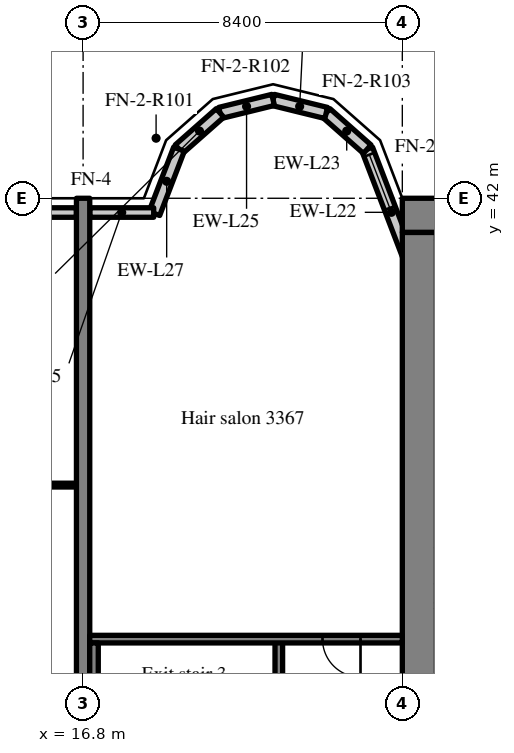
"""IFC4 building model, lengths in metres.
Left out: names, types, materials, properties, quantities, classifications, styles, units other than length and angle.
Written with IfcOpenShell. Run it as: python <this file> out.ifc"""

import sys

from ifc_helpers import new_model, si_unit, direction, frame, frame_2d, origin, place, context, subcontext, project, spatial, rectangle, extrude, source, transform, mapped, element, fill, save


model = new_model("IFC4")
c1 = context("Model", 3, precision=1e-05, world=origin(), true_north=direction((0.0, 1.0)))
c2 = subcontext(c1, "Body", "Model", "MODEL_VIEW")
j1 = project(units=[si_unit("LENGTHUNIT", "METRE"), si_unit("PLANEANGLEUNIT", "RADIAN")], contexts=[c1])
p1 = place(None, origin())
s1 = spatial("IfcSite", under=j1, at=p1, CompositionType="ELEMENT")
p2 = place(p1, origin())
s2 = spatial("IfcBuilding", under=s1, at=p2, CompositionType="ELEMENT")
p3 = place(p2, frame((0.0, 0.0, 137.0)))
s3 = spatial("IfcBuildingStorey", under=s2, at=p3, CompositionType="ELEMENT", Elevation=137.0)
m1 = source(origin(), c2, "Body", "SweptSolid", [
    extrude(rectangle(XDim=50.4, YDim=0.9, at=frame_2d((25.2, 0.0))), origin(), (0.0, 0.0, 1.0), 3.52),
])
p4 = place(p3, frame((25.2, 41.55, 0.0), z_axis=(0.0, 0.0, 1.0), x_axis=(1.0, 0.0, 0.0)))
e1 = element("IfcWall", 1, at=p4, inside=s3, PredefinedType="SHEAR", context=c2, shape_type="MappedRepresentation", body=[
    mapped(m1, transform((0.0, 0.0, 0.0), scale=1.0)),
])
m2 = source(origin(), c2, "Body", "SweptSolid", [
    extrude(rectangle(XDim=18.2, YDim=0.9, at=frame_2d((9.1, 0.0))), origin(), (0.0, 0.0, 1.0), 3.52),
])
p5 = place(p3, frame((25.65, 22.9, 0.0), z_axis=(0.0, 0.0, 1.0), x_axis=(0.0, 1.0, 0.0)))
e2 = element("IfcWall", 2, at=p5, inside=s3, PredefinedType="SHEAR", context=c2, shape_type="MappedRepresentation", body=[
    mapped(m2, transform((0.0, 0.0, 0.0), scale=1.0)),
])
m3 = source(origin(), c2, "Body", "SweptSolid", [
    extrude(rectangle(XDim=20.0, YDim=0.35, at=frame_2d((10.0, 0.0))), origin(), (0.0, 0.0, 1.0), 3.52),
])
p6 = place(p3, frame((16.8, 22.0, 0.0), z_axis=(0.0, 0.0, 1.0), x_axis=(0.0, 1.0, 0.0)))
e3 = element("IfcWall", 3, at=p6, inside=s3, PredefinedType="SHEAR", context=c2, shape_type="MappedRepresentation", body=[
    mapped(m3, transform((0.0, 0.0, 0.0), scale=1.0)),
])
m4 = source(origin(), c2, "Body", "SweptSolid", [
    extrude(rectangle(XDim=3.559, YDim=0.3, at=frame_2d((1.78, 0.0))), origin(), (0.0, 0.0, 1.0), 3.52),
])
p7 = place(p3, frame((25.55, 39.969, 0.0), z_axis=(0.0, 0.0, 1.0), x_axis=(-0.35779745313, 0.933799219604, 0.0)))
e4 = element("IfcWall", 4, at=p7, inside=s3, PredefinedType="SOLIDWALL", context=c2, shape_type="MappedRepresentation", body=[
    mapped(m4, transform((0.0, 0.0, 0.0), scale=1.0)),
])
m5 = source(origin(), c2, "Body", "SweptSolid", [
    extrude(rectangle(XDim=1.5, YDim=2.0, at=frame_2d((0.75, 1.0))), frame((0.0, 0.16, 0.0), z_axis=(0.0, -1.0, 0.0), x_axis=(1.0, 0.0, 0.0)), (0.0, 0.0, 1.0), 0.32),
])
p8 = place(p7, frame((1.903, 0.0, 0.9)))
e5 = element("IfcOpeningElement", 5, at=p8, cuts=e4, PredefinedType="OPENING", context=c2, shape_type="MappedRepresentation", body=[
    mapped(m5, transform((0.0, 0.0, 0.0), scale=1.0)),
])
m6 = source(origin(), c2, "Body", "SweptSolid", [
    extrude(rectangle(XDim=1.44, YDim=0.3, at=frame_2d((0.72, 0.0))), origin(), (0.0, 0.0, 1.0), 3.52),
])
p9 = place(p3, frame((24.277, 43.292, 0.0), z_axis=(0.0, 0.0, 1.0), x_axis=(-0.749649827867, 0.661834673902, 0.0)))
e6 = element("IfcWall", 6, at=p9, inside=s3, PredefinedType="SOLIDWALL", context=c2, shape_type="MappedRepresentation", body=[
    mapped(m6, transform((0.0, 0.0, 0.0), scale=1.0)),
])
m7 = source(origin(), c2, "Body", "SweptSolid", [
    extrude(rectangle(XDim=1.438, YDim=0.3, at=frame_2d((0.719, 0.0))), origin(), (0.0, 0.0, 1.0), 3.52),
])
p10 = place(p3, frame((23.197, 44.245, 0.0), z_axis=(0.0, 0.0, 1.0), x_axis=(-0.971152283879, 0.238460146601, 0.0)))
e7 = element("IfcWall", 7, at=p10, inside=s3, PredefinedType="SOLIDWALL", context=c2, shape_type="MappedRepresentation", body=[
    mapped(m7, transform((0.0, 0.0, 0.0), scale=1.0)),
])
m8 = source(origin(), c2, "Body", "SweptSolid", [
    extrude(rectangle(XDim=1.439, YDim=0.3, at=frame_2d((0.719, 0.0))), origin(), (0.0, 0.0, 1.0), 3.52),
])
p11 = place(p3, frame((21.8, 44.588, 0.0), z_axis=(0.0, 0.0, 1.0), x_axis=(-0.971161932466, -0.238420848351, 0.0)))
e8 = element("IfcWall", 8, at=p11, inside=s3, PredefinedType="SOLIDWALL", context=c2, shape_type="MappedRepresentation", body=[
    mapped(m8, transform((0.0, 0.0, 0.0), scale=1.0)),
])
m9 = source(origin(), c2, "Body", "SweptSolid", [
    extrude(rectangle(XDim=1.44, YDim=0.3, at=frame_2d((0.72, 0.0))), origin(), (0.0, 0.0, 1.0), 3.52),
])
p12 = place(p3, frame((20.403, 44.245, 0.0), z_axis=(0.0, 0.0, 1.0), x_axis=(-0.74957555648, -0.661918790432, 0.0)))
e9 = element("IfcWall", 9, at=p12, inside=s3, PredefinedType="SOLIDWALL", context=c2, shape_type="MappedRepresentation", body=[
    mapped(m9, transform((0.0, 0.0, 0.0), scale=1.0)),
])
m10 = source(origin(), c2, "Body", "SweptSolid", [
    extrude(rectangle(XDim=1.812, YDim=0.3, at=frame_2d((0.906, 0.0))), origin(), (0.0, 0.0, 1.0), 3.52),
])
p13 = place(p3, frame((19.323, 43.292, 0.0), z_axis=(0.0, 0.0, 1.0), x_axis=(-0.357877270961, -0.93376863244, 0.0)))
e10 = element("IfcWall", 10, at=p13, inside=s3, PredefinedType="SOLIDWALL", context=c2, shape_type="MappedRepresentation", body=[
    mapped(m10, transform((0.0, 0.0, 0.0), scale=1.0)),
])
m11 = source(origin(), c2, "Body", "SweptSolid", [
    extrude(rectangle(XDim=3.675, YDim=0.25, at=frame_2d((1.837, 0.0))), origin(), (0.0, 0.0, 1.0), 2.82),
])
p14 = place(p3, frame((16.625, 41.625, 0.0), z_axis=(0.0, 0.0, 1.0), x_axis=(-1.0, 0.0, 0.0)))
e11 = element("IfcWall", 11, at=p14, inside=s3, PredefinedType="SOLIDWALL", context=c2, shape_type="MappedRepresentation", body=[
    mapped(m11, transform((0.0, 0.0, 0.0), scale=1.0)),
])
m12 = source(origin(), c2, "Body", "SweptSolid", [
    extrude(rectangle(XDim=1.5, YDim=1.5, at=frame_2d((0.75, 0.75))), frame((0.0, 0.135, 0.0), z_axis=(0.0, -1.0, 0.0), x_axis=(1.0, 0.0, 0.0)), (0.0, 0.0, 1.0), 0.27),
])
p15 = place(p14, frame((1.087, 0.0, 0.9)))
e12 = element("IfcOpeningElement", 12, at=p15, cuts=e11, PredefinedType="OPENING", context=c2, shape_type="MappedRepresentation", body=[
    mapped(m12, transform((0.0, 0.0, 0.0), scale=1.0)),
])
m13 = source(origin(), c2, "Body", "SweptSolid", [
    extrude(rectangle(XDim=1.683, YDim=0.25, at=frame_2d((0.841, 0.0))), origin(), (0.0, 0.0, 1.0), 2.82),
])
p16 = place(p3, frame((18.658, 41.625, 0.0), z_axis=(0.0, 0.0, 1.0), x_axis=(-1.0, 0.0, 0.0)))
e13 = element("IfcWall", 13, at=p16, inside=s3, PredefinedType="SOLIDWALL", context=c2, shape_type="MappedRepresentation", body=[
    mapped(m13, transform((0.0, 0.0, 0.0), scale=1.0)),
])
m14 = source(origin(), c2, "Body", "SweptSolid", [
    extrude(rectangle(XDim=8.3, YDim=0.2, at=frame_2d((4.15, 0.0))), origin(), (0.0, 0.0, 1.0), 3.52),
])
p17 = place(p3, frame((21.95, 22.1, 0.0), z_axis=(0.0, 0.0, 1.0), x_axis=(0.0, 1.0, 0.0)))
e14 = element("IfcWall", 14, at=p17, inside=s3, PredefinedType="SOLIDWALL", context=c2, shape_type="MappedRepresentation", body=[
    mapped(m14, transform((0.0, 0.0, 0.0), scale=1.0)),
])
m15 = source(origin(), c2, "Body", "SweptSolid", [
    extrude(rectangle(XDim=1.2, YDim=2.1, at=frame_2d((0.6, 1.05))), frame((0.0, 0.11, 0.0), z_axis=(0.0, -1.0, 0.0), x_axis=(1.0, 0.0, 0.0)), (0.0, 0.0, 1.0), 0.22),
])
p18 = place(p17, frame((0.6, 0.0, 0.0)))
e15 = element("IfcOpeningElement", 15, at=p18, cuts=e14, PredefinedType="OPENING", context=c2, shape_type="MappedRepresentation", body=[
    mapped(m15, transform((0.0, 0.0, 0.0), scale=1.0)),
])
m16 = source(origin(), c2, "Body", "SweptSolid", [
    extrude(rectangle(XDim=8.225, YDim=0.2, at=frame_2d((4.112, 0.0))), origin(), (0.0, 0.0, 1.0), 3.52),
])
p19 = place(p3, frame((16.975, 30.4, 0.0), z_axis=(0.0, 0.0, 1.0), x_axis=(1.0, 0.0, 0.0)))
e16 = element("IfcWall", 16, at=p19, inside=s3, PredefinedType="SOLIDWALL", context=c2, shape_type="MappedRepresentation", body=[
    mapped(m16, transform((0.0, 0.0, 0.0), scale=1.0)),
])
m17 = source(origin(), c2, "Body", "SweptSolid", [
    extrude(rectangle(XDim=1.0, YDim=2.1, at=frame_2d((0.5, 1.05))), frame((0.0, 0.11, 0.0), z_axis=(0.0, -1.0, 0.0), x_axis=(1.0, 0.0, 0.0)), (0.0, 0.0, 1.0), 0.22),
])
p20 = place(p19, frame((6.125, 0.0, 0.0)))
e17 = element("IfcOpeningElement", 17, at=p20, cuts=e16, PredefinedType="OPENING", context=c2, shape_type="MappedRepresentation", body=[
    mapped(m17, transform((0.0, 0.0, 0.0), scale=1.0)),
])
m18 = source(origin(), c2, "Body", "SweptSolid", [
    extrude(rectangle(XDim=8.1, YDim=0.225, at=frame_2d((4.05, 0.0))), origin(), (0.0, 0.0, 1.0), 3.52),
])
p21 = place(p3, frame((17.087, 22.2, 0.0), z_axis=(0.0, 0.0, 1.0), x_axis=(0.0, 1.0, 0.0)))
e18 = element("IfcWall", 18, at=p21, inside=s3, PredefinedType="SOLIDWALL", context=c2, shape_type="MappedRepresentation", body=[
    mapped(m18, transform((0.0, 0.0, 0.0), scale=1.0)),
])
m19 = source(origin(), c2, "Body", "SweptSolid", [
    extrude(rectangle(XDim=8.05, YDim=0.1, at=frame_2d((4.025, 0.0))), origin(), (0.0, 0.0, 1.0), 3.52),
])
p22 = place(p3, frame((8.575, 34.453, 0.0), z_axis=(0.0, 0.0, 1.0), x_axis=(1.0, 0.0, 0.0)))
e19 = element("IfcWall", 19, at=p22, inside=s3, PredefinedType="PARTITIONING", context=c2, shape_type="MappedRepresentation", body=[
    mapped(m19, transform((0.0, 0.0, 0.0), scale=1.0)),
])
m20 = source(origin(), c2, "Body", "SweptSolid", [
    extrude(rectangle(XDim=1.8, YDim=2.1, at=frame_2d((0.9, 1.05))), frame((0.0, 0.06, 0.0), z_axis=(0.0, -1.0, 0.0), x_axis=(1.0, 0.0, 0.0)), (0.0, 0.0, 1.0), 0.12),
])
p23 = place(p22, frame((3.125, 0.0, 0.0)))
e20 = element("IfcOpeningElement", 20, at=p23, cuts=e19, PredefinedType="OPENING", context=c2, shape_type="MappedRepresentation", body=[
    mapped(m20, transform((0.0, 0.0, 0.0), scale=1.0)),
])
m21 = source(origin(), c2, "Body", "SweptSolid", [
    extrude(rectangle(XDim=1.5, YDim=2.0, at=frame_2d((0.75, 1.0))), frame((0.0, 0.03, 0.0), z_axis=(0.0, -1.0, 0.0), x_axis=(1.0, 0.0, 0.0)), (0.0, 0.0, 1.0), 0.06),
])
p24 = place(p8, origin())
e21 = element("IfcWindow", 21, at=p24, inside=s3, PartitioningType="SINGLE_PANEL", PredefinedType="WINDOW", context=c2, shape_type="MappedRepresentation", body=[
    mapped(m21, transform((0.0, 0.0, 0.0), scale=1.0)),
])
fill(e5, e21)
m22 = source(origin(), c2, "Body", "SweptSolid", [
    extrude(rectangle(XDim=1.0, YDim=2.1, at=frame_2d((0.5, 1.05))), frame((0.0, 0.025, 0.0), z_axis=(0.0, -1.0, 0.0), x_axis=(1.0, 0.0, 0.0)), (0.0, 0.0, 1.0), 0.05),
])
p25 = place(p20, origin())
e22 = element("IfcDoor", 22, at=p25, inside=s3, OperationType="SINGLE_SWING_RIGHT", PredefinedType="DOOR", context=c2, shape_type="MappedRepresentation", body=[
    mapped(m22, transform((0.0, 0.0, 0.0), scale=1.0)),
])
fill(e17, e22)
save(model, sys.argv[1])
